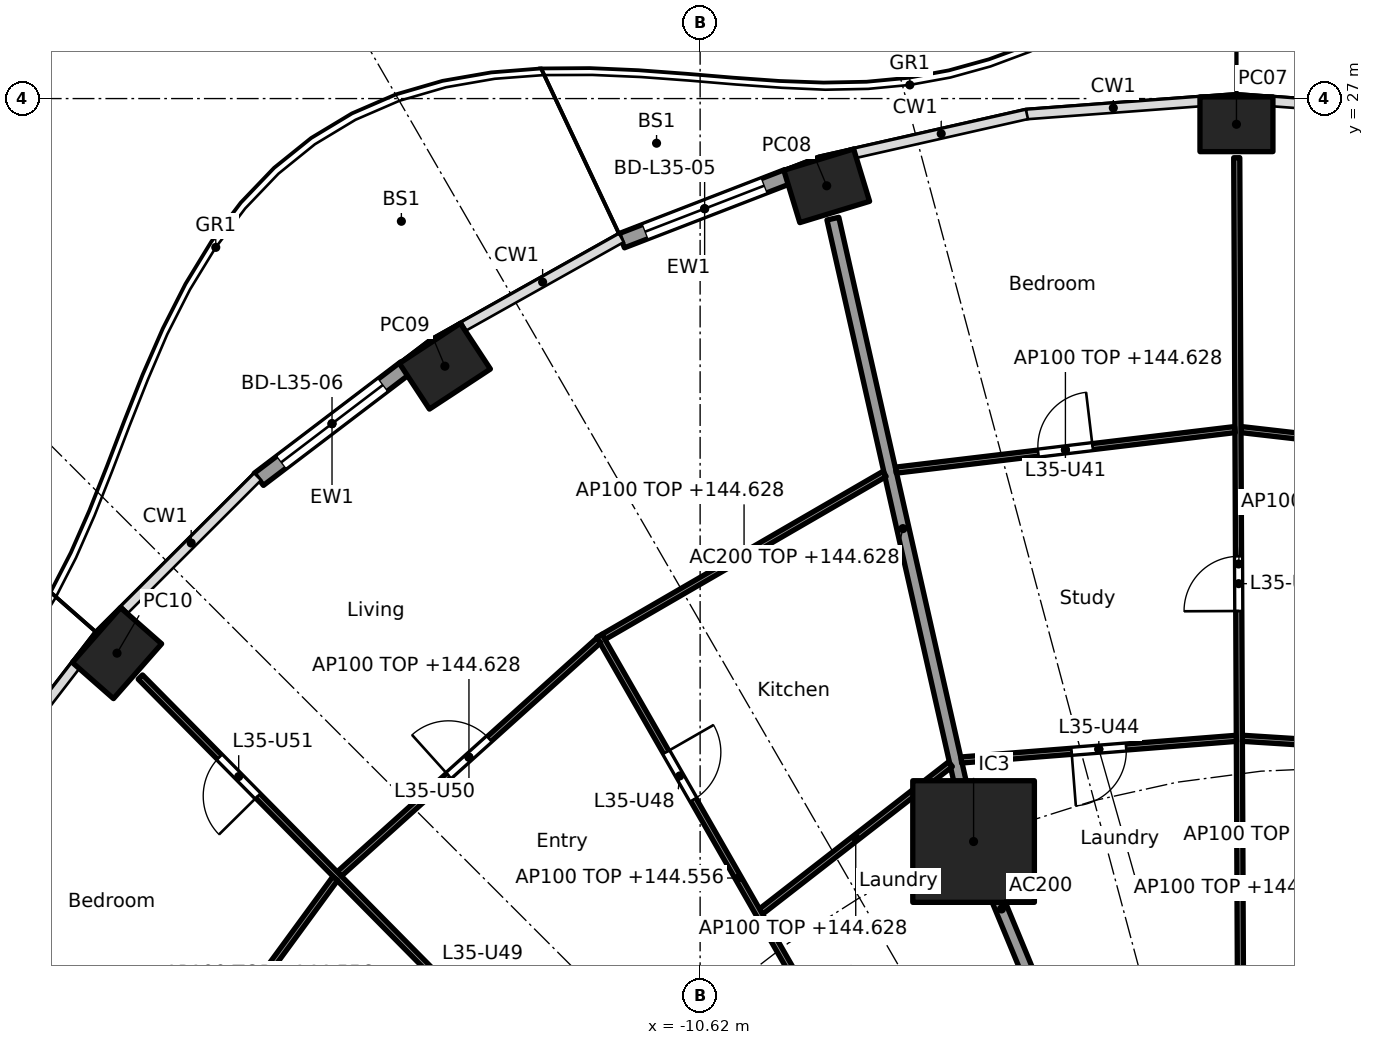
"""IFC4 building model, lengths in metres.
Left out: names, types, materials, properties, quantities, classifications, styles, units other than length and angle.
Written with IfcOpenShell. Run it as: python <this file> out.ifc"""

import sys

from ifc_helpers import new_model, si_unit, direction, frame, frame_2d, origin, origin_2d, place, context, subcontext, project, spatial, rectangle, hollow_rectangle, extrude, element, fill, save


model = new_model("IFC4")
c1 = context("Model", 3, precision=1e-05, world=origin(), true_north=direction((0.0, 1.0)))
c2 = subcontext(c1, "Body", "Model", "MODEL_VIEW")
j1 = project(units=[si_unit("LENGTHUNIT", "METRE"), si_unit("PLANEANGLEUNIT", "RADIAN")], contexts=[c1])
p1 = place(None, origin())
s1 = spatial("IfcSite", under=j1, at=p1, CompositionType="ELEMENT")
p2 = place(p1, origin())
s2 = spatial("IfcBuilding", under=s1, at=p2, CompositionType="ELEMENT")
p3 = place(p2, frame((0.0, 0.0, 141.8)))
s3 = spatial("IfcBuildingStorey", under=s2, at=p3, CompositionType="ELEMENT", Elevation=141.8)
for number, where, z_axis, x_axis in (
    (1, (-1.8, 26.577, 0.0), (0.0, 0.0, 1.0), (-1.0, 0.0, 0.0)),
    (2, (-8.538, 25.565, 0.0), (0.0, 0.0, 1.0), (-0.957, -0.292, 0.0)),
    (3, (-14.817, 22.599, 0.0), (0.0, 0.0, 1.0), (-0.836, -0.549, 0.0)),
    (4, (-20.209, 17.88, 0.0), (0.0, 0.0, 1.0), (-0.66, -0.751, 0.0)),
):
    element("IfcColumn", number, at=place(p3, frame(where, z_axis=z_axis, x_axis=x_axis)), inside=s3, PredefinedType="COLUMN", context=c2, shape_type="SweptSolid", body=[
        extrude(hollow_rectangle(XDim=1.2, YDim=0.9, WallThickness=0.04, at=origin_2d()), origin(), (0.0, 0.0, 1.0), 3.7),
    ])
p4 = place(p3, frame((-6.123, 14.782, 0.0), z_axis=(0.0, 0.0, 1.0), x_axis=(1.0, 0.0, 0.0)))
e5 = element("IfcColumn", 5, at=p4, inside=s3, PredefinedType="COLUMN", context=c2, shape_type="SweptSolid", body=[
    extrude(rectangle(XDim=2.0, YDim=2.0, at=origin_2d()), origin(), (0.0, 0.0, 1.0), 3.7),
])
p5 = place(p3, frame((-11.909, 24.662, 0.0), z_axis=(0.0, 0.0, 1.0), x_axis=(0.932845344347, 0.360277064952, 0.0)))
e6 = element("IfcWall", 6, at=p5, inside=s3, PredefinedType="SOLIDWALL", context=c2, shape_type="SweptSolid", body=[
    extrude(rectangle(XDim=2.923, YDim=0.25, at=frame_2d((1.462, 0.0))), origin(), (0.0, 0.0, 1.0), 3.44),
])
p6 = place(p5, frame((0.412, 0.0, 0.0)))
e7 = element("IfcOpeningElement", 7, at=p6, cuts=e6, PredefinedType="OPENING", context=c2, shape_type="SweptSolid", body=[
    extrude(rectangle(XDim=2.1, YDim=2.4, at=frame_2d((1.05, 1.2))), frame((0.0, 0.135, 0.0), z_axis=(0.0, -1.0, 0.0), x_axis=(1.0, 0.0, 0.0)), (0.0, 0.0, 1.0), 0.27),
])
p7 = place(p3, frame((-17.878, 20.738, 0.0), z_axis=(0.0, 0.0, 1.0), x_axis=(0.796022231079, 0.605267385233, 0.0)))
e8 = element("IfcWall", 8, at=p7, inside=s3, PredefinedType="SOLIDWALL", context=c2, shape_type="SweptSolid", body=[
    extrude(rectangle(XDim=3.026, YDim=0.25, at=frame_2d((1.513, 0.0))), origin(), (0.0, 0.0, 1.0), 3.44),
])
p8 = place(p7, frame((0.463, 0.0, 0.0)))
e9 = element("IfcOpeningElement", 9, at=p8, cuts=e8, PredefinedType="OPENING", context=c2, shape_type="SweptSolid", body=[
    extrude(rectangle(XDim=2.1, YDim=2.4, at=frame_2d((1.05, 1.2))), frame((0.0, 0.135, 0.0), z_axis=(0.0, -1.0, 0.0), x_axis=(1.0, 0.0, 0.0)), (0.0, 0.0, 1.0), 0.27),
])
p9 = place(p3, frame((-5.243, 12.657, 0.0), z_axis=(0.0, 0.0, 1.0), x_axis=(-0.38273085373, 0.923859888513, 0.0)))
e10 = element("IfcWall", 10, at=p9, inside=s3, PredefinedType="PARTITIONING", context=c2, shape_type="SweptSolid", body=[
    extrude(rectangle(XDim=2.199, YDim=0.2, at=frame_2d((1.1, 0.0))), origin(), (0.0, 0.0, 1.0), 3.44),
])
p10 = place(p3, frame((-6.134, 14.831, 0.0), z_axis=(0.0, 0.0, 1.0), x_axis=(-0.220337590808, 0.975423675167, 0.0)))
e11 = element("IfcWall", 11, at=p10, inside=s3, PredefinedType="PARTITIONING", context=c2, shape_type="SweptSolid", body=[
    extrude(rectangle(XDim=10.451, YDim=0.2, at=frame_2d((5.226, 0.0))), origin(), (0.0, 0.0, 1.0), 2.828),
])
p11 = place(p3, frame((2.685, 16.202, 0.0), z_axis=(0.0, 0.0, 1.0), x_axis=(-0.998000808042, 0.063201164138, 0.0)))
e12 = element("IfcWall", 12, at=p11, inside=s3, PredefinedType="PARTITIONING", context=c2, shape_type="SweptSolid", body=[
    extrude(rectangle(XDim=4.396, YDim=0.1, at=frame_2d((2.198, 0.0))), origin(), (0.0, 0.0, 1.0), 2.828),
])
p12 = place(p11, frame((1.773, 0.0, 0.0)))
e13 = element("IfcOpeningElement", 13, at=p12, cuts=e12, PredefinedType="OPENING", context=c2, shape_type="SweptSolid", body=[
    extrude(rectangle(XDim=0.9, YDim=2.1, at=frame_2d((0.45, 1.05))), frame((0.0, 0.06, 0.0), z_axis=(0.0, -1.0, 0.0), x_axis=(1.0, 0.0, 0.0)), (0.0, 0.0, 1.0), 0.12),
])
p13 = place(p3, frame((3.851, 20.919, 0.0), z_axis=(0.0, 0.0, 1.0), x_axis=(-0.993519908136, 0.11365822512, 0.0)))
e14 = element("IfcWall", 14, at=p13, inside=s3, PredefinedType="PARTITIONING", context=c2, shape_type="SweptSolid", body=[
    extrude(rectangle(XDim=5.613, YDim=0.1, at=frame_2d((2.806, 0.0))), origin(), (0.0, 0.0, 1.0), 2.828),
])
p14 = place(p3, frame((-1.735, 12.665, 0.0), z_axis=(0.0, 0.0, 1.0), x_axis=(-0.004494500855, 0.99998989968, 0.0)))
e15 = element("IfcWall", 15, at=p14, inside=s3, PredefinedType="PARTITIONING", context=c2, shape_type="SweptSolid", body=[
    extrude(rectangle(XDim=13.363, YDim=0.1, at=frame_2d((6.681, 0.0))), origin(), (0.0, 0.0, 1.0), 2.756),
])
p15 = place(p14, frame((5.908, 0.0, 0.0)))
e16 = element("IfcOpeningElement", 16, at=p15, cuts=e15, PredefinedType="OPENING", context=c2, shape_type="SweptSolid", body=[
    extrude(rectangle(XDim=0.9, YDim=2.1, at=frame_2d((0.45, 1.05))), frame((0.0, 0.06, 0.0), z_axis=(0.0, -1.0, 0.0), x_axis=(1.0, 0.0, 0.0)), (0.0, 0.0, 1.0), 0.12),
])
p16 = place(p3, frame((-1.802, 16.479, 0.0), z_axis=(0.0, 0.0, 1.0), x_axis=(-0.996907698294, -0.078581429625, 0.0)))
e17 = element("IfcWall", 17, at=p16, inside=s3, PredefinedType="PARTITIONING", context=c2, shape_type="SweptSolid", body=[
    extrude(rectangle(XDim=4.536, YDim=0.1, at=frame_2d((2.268, 0.0))), origin(), (0.0, 0.0, 1.0), 2.828),
])
p17 = place(p16, frame((1.818, 0.0, 0.0)))
e18 = element("IfcOpeningElement", 18, at=p17, cuts=e17, PredefinedType="OPENING", context=c2, shape_type="SweptSolid", body=[
    extrude(rectangle(XDim=0.9, YDim=2.1, at=frame_2d((0.45, 1.05))), frame((0.0, 0.06, 0.0), z_axis=(0.0, -1.0, 0.0), x_axis=(1.0, 0.0, 0.0)), (0.0, 0.0, 1.0), 0.12),
])
p18 = place(p3, frame((-1.825, 21.557, 0.0), z_axis=(0.0, 0.0, 1.0), x_axis=(-0.992915053711, -0.11882632753, 0.0)))
e19 = element("IfcWall", 19, at=p18, inside=s3, PredefinedType="PARTITIONING", context=c2, shape_type="SweptSolid", body=[
    extrude(rectangle(XDim=5.615, YDim=0.1, at=frame_2d((2.808, 0.0))), origin(), (0.0, 0.0, 1.0), 2.828),
])
p19 = place(p18, frame((2.358, 0.0, 0.0)))
e20 = element("IfcOpeningElement", 20, at=p19, cuts=e19, PredefinedType="OPENING", context=c2, shape_type="SweptSolid", body=[
    extrude(rectangle(XDim=0.9, YDim=2.1, at=frame_2d((0.45, 1.05))), frame((0.0, 0.06, 0.0), z_axis=(0.0, -1.0, 0.0), x_axis=(1.0, 0.0, 0.0)), (0.0, 0.0, 1.0), 0.12),
])
p20 = place(p3, frame((-6.503, 16.054, 0.0), z_axis=(0.0, 0.0, 1.0), x_axis=(-0.789428807693, -0.613842127574, 0.0)))
e21 = element("IfcWall", 21, at=p20, inside=s3, PredefinedType="PARTITIONING", context=c2, shape_type="SweptSolid", body=[
    extrude(rectangle(XDim=3.948, YDim=0.1, at=frame_2d((1.974, 0.0))), origin(), (0.0, 0.0, 1.0), 2.828),
])
p21 = place(p3, frame((-7.586, 20.827, 0.0), z_axis=(0.0, 0.0, 1.0), x_axis=(-0.865093450578, -0.501610727325, 0.0)))
e22 = element("IfcWall", 22, at=p21, inside=s3, PredefinedType="PARTITIONING", context=c2, shape_type="SweptSolid", body=[
    extrude(rectangle(XDim=5.343, YDim=0.1, at=frame_2d((2.671, 0.0))), origin(), (0.0, 0.0, 1.0), 2.828),
])
p22 = place(p3, frame((-7.708, 10.198, 0.0), z_axis=(0.0, 0.0, 1.0), x_axis=(-0.497449462689, 0.867492957937, 0.0)))
e23 = element("IfcWall", 23, at=p22, inside=s3, PredefinedType="PARTITIONING", context=c2, shape_type="SweptSolid", body=[
    extrude(rectangle(XDim=9.185, YDim=0.1, at=frame_2d((4.592, 0.0))), origin(), (0.0, 0.0, 1.0), 2.756),
])
p23 = place(p22, frame((1.511, 0.0, 0.0)))
e24 = element("IfcOpeningElement", 24, at=p23, cuts=e23, PredefinedType="OPENING", context=c2, shape_type="SweptSolid", body=[
    extrude(rectangle(XDim=0.9, YDim=2.1, at=frame_2d((0.45, 1.05))), frame((0.0, 0.06, 0.0), z_axis=(0.0, -1.0, 0.0), x_axis=(1.0, 0.0, 0.0)), (0.0, 0.0, 1.0), 0.12),
])
p24 = place(p22, frame((6.078, 0.0, 0.0)))
e25 = element("IfcOpeningElement", 25, at=p24, cuts=e23, PredefinedType="OPENING", context=c2, shape_type="SweptSolid", body=[
    extrude(rectangle(XDim=0.9, YDim=2.1, at=frame_2d((0.45, 1.05))), frame((0.0, 0.06, 0.0), z_axis=(0.0, -1.0, 0.0), x_axis=(1.0, 0.0, 0.0)), (0.0, 0.0, 1.0), 0.12),
])
p25 = place(p3, frame((-12.289, 18.089, 0.0), z_axis=(0.0, 0.0, 1.0), x_axis=(-0.743146066164, -0.669129228435, 0.0)))
e26 = element("IfcWall", 26, at=p25, inside=s3, PredefinedType="PARTITIONING", context=c2, shape_type="SweptSolid", body=[
    extrude(rectangle(XDim=5.739, YDim=0.1, at=frame_2d((2.87, 0.0))), origin(), (0.0, 0.0, 1.0), 2.828),
])
p26 = place(p25, frame((2.42, 0.0, 0.0)))
e27 = element("IfcOpeningElement", 27, at=p26, cuts=e26, PredefinedType="OPENING", context=c2, shape_type="SweptSolid", body=[
    extrude(rectangle(XDim=0.9, YDim=2.1, at=frame_2d((0.45, 1.05))), frame((0.0, 0.06, 0.0), z_axis=(0.0, -1.0, 0.0), x_axis=(1.0, 0.0, 0.0)), (0.0, 0.0, 1.0), 0.12),
])
p27 = place(p3, frame((-10.182, 7.729, 0.0), z_axis=(0.0, 0.0, 1.0), x_axis=(-0.702930219229, 0.7112588185, 0.0)))
e28 = element("IfcWall", 28, at=p27, inside=s3, PredefinedType="PARTITIONING", context=c2, shape_type="SweptSolid", body=[
    extrude(rectangle(XDim=13.719, YDim=0.1, at=frame_2d((6.859, 0.0))), origin(), (0.0, 0.0, 1.0), 2.756),
])
p28 = place(p27, frame((1.507, 0.0, 0.0)))
e29 = element("IfcOpeningElement", 29, at=p28, cuts=e28, PredefinedType="OPENING", context=c2, shape_type="SweptSolid", body=[
    extrude(rectangle(XDim=0.9, YDim=2.1, at=frame_2d((0.45, 1.05))), frame((0.0, 0.06, 0.0), z_axis=(0.0, -1.0, 0.0), x_axis=(1.0, 0.0, 0.0)), (0.0, 0.0, 1.0), 0.12),
])
p29 = place(p27, frame((6.067, 0.0, 0.0)))
e30 = element("IfcOpeningElement", 30, at=p29, cuts=e28, PredefinedType="OPENING", context=c2, shape_type="SweptSolid", body=[
    extrude(rectangle(XDim=0.9, YDim=2.1, at=frame_2d((0.45, 1.05))), frame((0.0, 0.06, 0.0), z_axis=(0.0, -1.0, 0.0), x_axis=(1.0, 0.0, 0.0)), (0.0, 0.0, 1.0), 0.12),
])
p30 = place(p27, frame((10.969, 0.0, 0.0)))
e31 = element("IfcOpeningElement", 31, at=p30, cuts=e28, PredefinedType="OPENING", context=c2, shape_type="SweptSolid", body=[
    extrude(rectangle(XDim=0.9, YDim=2.1, at=frame_2d((0.45, 1.05))), frame((0.0, 0.06, 0.0), z_axis=(0.0, -1.0, 0.0), x_axis=(1.0, 0.0, 0.0)), (0.0, 0.0, 1.0), 0.12),
])
p31 = place(p3, frame((-16.621, 14.174, 0.0), z_axis=(0.0, 0.0, 1.0), x_axis=(-0.590674917338, -0.806909624449, 0.0)))
e32 = element("IfcWall", 32, at=p31, inside=s3, PredefinedType="PARTITIONING", context=c2, shape_type="SweptSolid", body=[
    extrude(rectangle(XDim=5.949, YDim=0.1, at=frame_2d((2.975, 0.0))), origin(), (0.0, 0.0, 1.0), 2.828),
])
p32 = place(p31, frame((4.024, 0.0, 0.0)))
e33 = element("IfcOpeningElement", 33, at=p32, cuts=e32, PredefinedType="OPENING", context=c2, shape_type="SweptSolid", body=[
    extrude(rectangle(XDim=0.9, YDim=2.1, at=frame_2d((0.45, 1.05))), frame((0.0, 0.06, 0.0), z_axis=(0.0, -1.0, 0.0), x_axis=(1.0, 0.0, 0.0)), (0.0, 0.0, 1.0), 0.12),
])
p33 = place(p6, origin())
e34 = element("IfcDoor", 34, at=p33, inside=s3, OperationType="SLIDING_TO_LEFT", PredefinedType="DOOR", context=c2, shape_type="SweptSolid", body=[
    extrude(rectangle(XDim=2.1, YDim=2.4, at=frame_2d((1.05, 1.2))), frame((0.0, 0.025, 0.0), z_axis=(0.0, -1.0, 0.0), x_axis=(1.0, 0.0, 0.0)), (0.0, 0.0, 1.0), 0.05),
])
fill(e7, e34)
p34 = place(p8, origin())
e35 = element("IfcDoor", 35, at=p34, inside=s3, OperationType="SLIDING_TO_LEFT", PredefinedType="DOOR", context=c2, shape_type="SweptSolid", body=[
    extrude(rectangle(XDim=2.1, YDim=2.4, at=frame_2d((1.05, 1.2))), frame((0.0, 0.025, 0.0), z_axis=(0.0, -1.0, 0.0), x_axis=(1.0, 0.0, 0.0)), (0.0, 0.0, 1.0), 0.05),
])
fill(e9, e35)
p35 = place(p15, origin())
e36 = element("IfcDoor", 36, at=p35, inside=s3, OperationType="SINGLE_SWING_LEFT", PredefinedType="DOOR", context=c2, shape_type="SweptSolid", body=[
    extrude(rectangle(XDim=0.9, YDim=2.1, at=frame_2d((0.45, 1.05))), frame((0.0, 0.025, 0.0), z_axis=(0.0, -1.0, 0.0), x_axis=(1.0, 0.0, 0.0)), (0.0, 0.0, 1.0), 0.05),
])
fill(e16, e36)
p36 = place(p19, frame((0.9, 0.0, 0.0), x_axis=(-1.0, 0.0, 0.0)))
e37 = element("IfcDoor", 37, at=p36, inside=s3, OperationType="SINGLE_SWING_RIGHT", PredefinedType="DOOR", context=c2, shape_type="SweptSolid", body=[
    extrude(rectangle(XDim=0.9, YDim=2.1, at=frame_2d((0.45, 1.05))), frame((0.0, 0.025, 0.0), z_axis=(0.0, -1.0, 0.0), x_axis=(1.0, 0.0, 0.0)), (0.0, 0.0, 1.0), 0.05),
])
fill(e20, e37)
p37 = place(p17, origin())
e38 = element("IfcDoor", 38, at=p37, inside=s3, OperationType="SINGLE_SWING_RIGHT", PredefinedType="DOOR", context=c2, shape_type="SweptSolid", body=[
    extrude(rectangle(XDim=0.9, YDim=2.1, at=frame_2d((0.45, 1.05))), frame((0.0, 0.025, 0.0), z_axis=(0.0, -1.0, 0.0), x_axis=(1.0, 0.0, 0.0)), (0.0, 0.0, 1.0), 0.05),
])
fill(e18, e38)
p38 = place(p24, frame((0.9, 0.0, 0.0), x_axis=(-1.0, 0.0, 0.0)))
e39 = element("IfcDoor", 39, at=p38, inside=s3, OperationType="SINGLE_SWING_LEFT", PredefinedType="DOOR", context=c2, shape_type="SweptSolid", body=[
    extrude(rectangle(XDim=0.9, YDim=2.1, at=frame_2d((0.45, 1.05))), frame((0.0, 0.025, 0.0), z_axis=(0.0, -1.0, 0.0), x_axis=(1.0, 0.0, 0.0)), (0.0, 0.0, 1.0), 0.05),
])
fill(e25, e39)
p39 = place(p26, frame((0.9, 0.0, 0.0), x_axis=(-1.0, 0.0, 0.0)))
e40 = element("IfcDoor", 40, at=p39, inside=s3, OperationType="SINGLE_SWING_LEFT", PredefinedType="DOOR", context=c2, shape_type="SweptSolid", body=[
    extrude(rectangle(XDim=0.9, YDim=2.1, at=frame_2d((0.45, 1.05))), frame((0.0, 0.025, 0.0), z_axis=(0.0, -1.0, 0.0), x_axis=(1.0, 0.0, 0.0)), (0.0, 0.0, 1.0), 0.05),
])
fill(e27, e40)
p40 = place(p30, origin())
e41 = element("IfcDoor", 41, at=p40, inside=s3, OperationType="SINGLE_SWING_LEFT", PredefinedType="DOOR", context=c2, shape_type="SweptSolid", body=[
    extrude(rectangle(XDim=0.9, YDim=2.1, at=frame_2d((0.45, 1.05))), frame((0.0, 0.025, 0.0), z_axis=(0.0, -1.0, 0.0), x_axis=(1.0, 0.0, 0.0)), (0.0, 0.0, 1.0), 0.05),
])
fill(e31, e41)
save(model, sys.argv[1])
